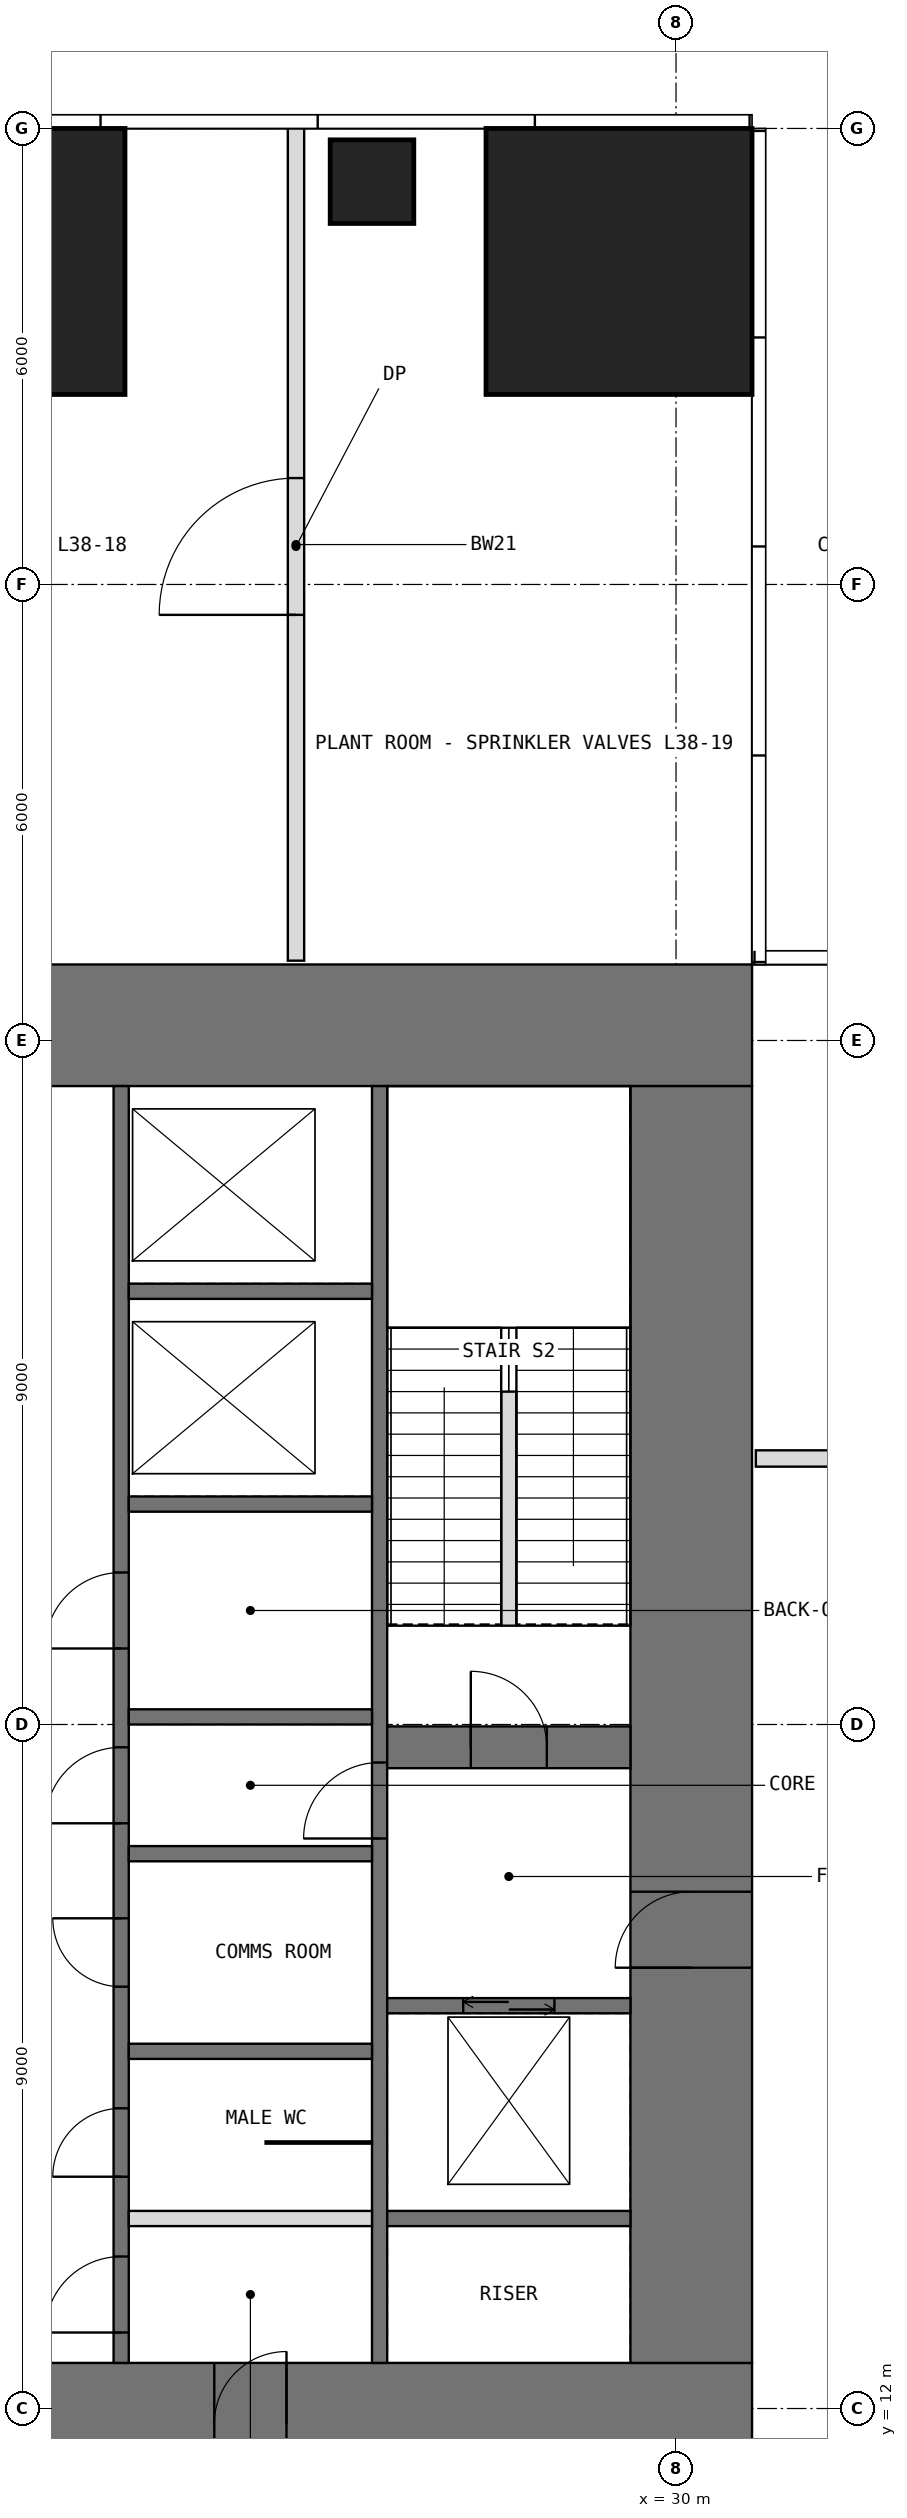
"""IFC4 building model, lengths in metres.
Left out: names, types, materials, properties, quantities, classifications, styles, units other than length and angle.
Written with IfcOpenShell. Run it as: python <this file> out.ifc"""

import sys

from ifc_helpers import new_model, si_unit, direction, frame, frame_2d, origin, origin_2d, place, context, subcontext, project, spatial, rectangle, extrude, element, fill, save


model = new_model("IFC4")
c1 = context("Model", 3, precision=1e-05, world=origin(), true_north=direction((0.0, 1.0)))
c2 = subcontext(c1, "Body", "Model", "MODEL_VIEW")
j1 = project(units=[si_unit("LENGTHUNIT", "METRE"), si_unit("PLANEANGLEUNIT", "RADIAN")], contexts=[c1])
p1 = place(None, origin())
s1 = spatial("IfcSite", under=j1, at=p1, CompositionType="ELEMENT")
p2 = place(p1, origin())
s2 = spatial("IfcBuilding", under=s1, at=p2, CompositionType="ELEMENT")
p3 = place(p2, frame((0.0, 0.0, 160.5)))
s3 = spatial("IfcBuildingStorey", under=s2, at=p3, CompositionType="ELEMENT", Elevation=160.5)
p4 = place(p3, frame((21.0, 40.25, 0.0), z_axis=(0.0, 0.0, 1.0), x_axis=(1.0, 0.0, 0.0)))
e1 = element("IfcColumn", 1, at=p4, inside=s3, PredefinedType="COLUMN", context=c2, shape_type="SweptSolid", body=[
    extrude(rectangle(XDim=3.5, YDim=3.5, at=origin_2d()), origin(), (0.0, 0.0, 1.0), 5.0),
])
p5 = place(p3, frame((26.0, 41.3, 0.0), z_axis=(0.0, 0.0, 1.0), x_axis=(1.0, 0.0, 0.0)))
e2 = element("IfcColumn", 2, at=p5, inside=s3, PredefinedType="COLUMN", context=c2, shape_type="SweptSolid", body=[
    extrude(rectangle(XDim=1.1, YDim=1.1, at=origin_2d()), origin(), (0.0, 0.0, 1.0), 5.0),
])
p6 = place(p3, frame((29.25, 40.25, 0.0), z_axis=(0.0, 0.0, 1.0), x_axis=(1.0, 0.0, 0.0)))
e3 = element("IfcColumn", 3, at=p6, inside=s3, PredefinedType="COLUMN", context=c2, shape_type="SweptSolid", body=[
    extrude(rectangle(XDim=3.5, YDim=3.5, at=origin_2d()), origin(), (0.0, 0.0, 1.0), 5.0),
])
p7 = place(p3, frame((11.0, 11.8, -0.25), z_axis=(0.0, 0.0, 1.0), x_axis=(1.0, 0.0, 0.0)))
e4 = element("IfcWall", 4, at=p7, inside=s3, PredefinedType="SHEAR", context=c2, shape_type="SweptSolid", body=[
    extrude(rectangle(XDim=20.0, YDim=1.6, at=frame_2d((10.0, 0.0))), origin(), (0.0, 0.0, 1.0), 5.2),
])
p8 = place(p7, frame((12.925, 0.0, 0.25)))
e5 = element("IfcOpeningElement", 5, at=p8, cuts=e4, PredefinedType="OPENING", context=c2, shape_type="SweptSolid", body=[
    extrude(rectangle(XDim=0.95, YDim=2.4, at=frame_2d((0.475, 1.2))), frame((0.0, 0.81, 0.0), z_axis=(0.0, -1.0, 0.0), x_axis=(1.0, 0.0, 0.0)), (0.0, 0.0, 1.0), 1.62),
])
p9 = place(p3, frame((11.0, 30.2, -0.25), z_axis=(0.0, 0.0, 1.0), x_axis=(1.0, 0.0, 0.0)))
e6 = element("IfcWall", 6, at=p9, inside=s3, PredefinedType="SHEAR", context=c2, shape_type="SweptSolid", body=[
    extrude(rectangle(XDim=20.0, YDim=1.6, at=frame_2d((10.0, 0.0))), origin(), (0.0, 0.0, 1.0), 5.2),
])
p10 = place(p9, frame((6.125, 0.0, 0.25)))
e7 = element("IfcOpeningElement", 7, at=p10, cuts=e6, PredefinedType="OPENING", context=c2, shape_type="SweptSolid", body=[
    extrude(rectangle(XDim=0.95, YDim=2.4, at=frame_2d((0.475, 1.2))), frame((0.0, 0.81, 0.0), z_axis=(0.0, -1.0, 0.0), x_axis=(1.0, 0.0, 0.0)), (0.0, 0.0, 1.0), 1.62),
])
p11 = place(p3, frame((30.2, 12.6, -0.25), z_axis=(0.0, 0.0, 1.0), x_axis=(0.0, 1.0, 0.0)))
e8 = element("IfcWall", 8, at=p11, inside=s3, PredefinedType="SHEAR", context=c2, shape_type="SweptSolid", body=[
    extrude(rectangle(XDim=16.8, YDim=1.6, at=frame_2d((8.4, 0.0))), origin(), (0.0, 0.0, 1.0), 5.2),
])
p12 = place(p11, frame((5.2, 0.0, 0.25)))
e9 = element("IfcOpeningElement", 9, at=p12, cuts=e8, PredefinedType="OPENING", context=c2, shape_type="SweptSolid", body=[
    extrude(rectangle(XDim=1.0, YDim=2.2, at=frame_2d((0.5, 1.1))), frame((0.0, 0.81, 0.0), z_axis=(0.0, -1.0, 0.0), x_axis=(1.0, 0.0, 0.0)), (0.0, 0.0, 1.0), 1.62),
])
p13 = place(p3, frame((22.7, 12.6, -0.25), z_axis=(0.0, 0.0, 1.0), x_axis=(0.0, 1.0, 0.0)))
e10 = element("IfcWall", 10, at=p13, inside=s3, PredefinedType="SHEAR", context=c2, shape_type="SweptSolid", body=[
    extrude(rectangle(XDim=16.8, YDim=0.2, at=frame_2d((8.4, 0.0))), origin(), (0.0, 0.0, 1.0), 5.2),
])
p14 = place(p13, frame((0.4, 0.0, 0.25)))
e11 = element("IfcOpeningElement", 11, at=p14, cuts=e10, PredefinedType="OPENING", context=c2, shape_type="SweptSolid", body=[
    extrude(rectangle(XDim=1.0, YDim=2.2, at=frame_2d((0.5, 1.1))), frame((0.0, 0.11, 0.0), z_axis=(0.0, -1.0, 0.0), x_axis=(1.0, 0.0, 0.0)), (0.0, 0.0, 1.0), 0.22),
])
p15 = place(p13, frame((7.1, 0.0, 0.25)))
e12 = element("IfcOpeningElement", 12, at=p15, cuts=e10, PredefinedType="OPENING", context=c2, shape_type="SweptSolid", body=[
    extrude(rectangle(XDim=1.0, YDim=2.2, at=frame_2d((0.5, 1.1))), frame((0.0, 0.11, 0.0), z_axis=(0.0, -1.0, 0.0), x_axis=(1.0, 0.0, 0.0)), (0.0, 0.0, 1.0), 0.22),
])
p16 = place(p13, frame((2.45, 0.0, 0.25)))
e13 = element("IfcOpeningElement", 13, at=p16, cuts=e10, PredefinedType="OPENING", context=c2, shape_type="SweptSolid", body=[
    extrude(rectangle(XDim=0.9, YDim=2.2, at=frame_2d((0.45, 1.1))), frame((0.0, 0.11, 0.0), z_axis=(0.0, -1.0, 0.0), x_axis=(1.0, 0.0, 0.0)), (0.0, 0.0, 1.0), 0.22),
])
p17 = place(p13, frame((4.95, 0.0, 0.25)))
e14 = element("IfcOpeningElement", 14, at=p17, cuts=e10, PredefinedType="OPENING", context=c2, shape_type="SweptSolid", body=[
    extrude(rectangle(XDim=0.9, YDim=2.2, at=frame_2d((0.45, 1.1))), frame((0.0, 0.11, 0.0), z_axis=(0.0, -1.0, 0.0), x_axis=(1.0, 0.0, 0.0)), (0.0, 0.0, 1.0), 0.22),
])
p18 = place(p13, frame((9.4, 0.0, 0.25)))
e15 = element("IfcOpeningElement", 15, at=p18, cuts=e10, PredefinedType="OPENING", context=c2, shape_type="SweptSolid", body=[
    extrude(rectangle(XDim=1.0, YDim=2.2, at=frame_2d((0.5, 1.1))), frame((0.0, 0.11, 0.0), z_axis=(0.0, -1.0, 0.0), x_axis=(1.0, 0.0, 0.0)), (0.0, 0.0, 1.0), 0.22),
])
p19 = place(p3, frame((26.1, 12.6, -0.25), z_axis=(0.0, 0.0, 1.0), x_axis=(0.0, 1.0, 0.0)))
e16 = element("IfcWall", 16, at=p19, inside=s3, PredefinedType="SHEAR", context=c2, shape_type="SweptSolid", body=[
    extrude(rectangle(XDim=16.8, YDim=0.2, at=frame_2d((8.4, 0.0))), origin(), (0.0, 0.0, 1.0), 5.2),
])
p20 = place(p19, frame((6.9, 0.0, 0.25)))
e17 = element("IfcOpeningElement", 17, at=p20, cuts=e16, PredefinedType="OPENING", context=c2, shape_type="SweptSolid", body=[
    extrude(rectangle(XDim=1.0, YDim=2.2, at=frame_2d((0.5, 1.1))), frame((0.0, 0.11, 0.0), z_axis=(0.0, -1.0, 0.0), x_axis=(1.0, 0.0, 0.0)), (0.0, 0.0, 1.0), 0.22),
])
for number, where, z_axis, x_axis in (
    (18, (22.8, 16.7, -0.25), (0.0, 0.0, 1.0), (1.0, 0.0, 0.0)),
    (19, (22.8, 19.3, -0.25), (0.0, 0.0, 1.0), (1.0, 0.0, 0.0)),
    (20, (22.8, 21.1, -0.25), (0.0, 0.0, 1.0), (1.0, 0.0, 0.0)),
    (21, (22.8, 23.9, -0.25), (0.0, 0.0, 1.0), (1.0, 0.0, 0.0)),
    (22, (22.8, 26.7, -0.25), (0.0, 0.0, 1.0), (1.0, 0.0, 0.0)),
    (23, (26.2, 14.5, -0.25), (0.0, 0.0, 1.0), (1.0, 0.0, 0.0)),
):
    element("IfcWall", number, at=place(p3, frame(where, z_axis=z_axis, x_axis=x_axis)), inside=s3, PredefinedType="SHEAR", context=c2, shape_type="SweptSolid", body=[
        extrude(rectangle(XDim=3.2, YDim=0.2, at=frame_2d((1.6, 0.0))), origin(), (0.0, 0.0, 1.0), 5.2),
    ])
p21 = place(p3, frame((26.2, 17.3, -0.25), z_axis=(0.0, 0.0, 1.0), x_axis=(1.0, 0.0, 0.0)))
e24 = element("IfcWall", 24, at=p21, inside=s3, PredefinedType="SHEAR", context=c2, shape_type="SweptSolid", body=[
    extrude(rectangle(XDim=3.2, YDim=0.2, at=frame_2d((1.6, 0.0))), origin(), (0.0, 0.0, 1.0), 5.2),
])
p22 = place(p21, frame((1.0, 0.0, 0.25)))
e25 = element("IfcOpeningElement", 25, at=p22, cuts=e24, PredefinedType="OPENING", context=c2, shape_type="SweptSolid", body=[
    extrude(rectangle(XDim=1.2, YDim=2.2, at=frame_2d((0.6, 1.1))), frame((0.0, 0.11, 0.0), z_axis=(0.0, -1.0, 0.0), x_axis=(1.0, 0.0, 0.0)), (0.0, 0.0, 1.0), 0.22),
])
p23 = place(p3, frame((26.2, 20.7, -0.25), z_axis=(0.0, 0.0, 1.0), x_axis=(1.0, 0.0, 0.0)))
e26 = element("IfcWall", 26, at=p23, inside=s3, PredefinedType="SHEAR", context=c2, shape_type="SweptSolid", body=[
    extrude(rectangle(XDim=3.2, YDim=0.55, at=frame_2d((1.6, 0.0))), origin(), (0.0, 0.0, 1.0), 5.2),
])
p24 = place(p23, frame((1.1, 0.0, 0.25)))
e27 = element("IfcOpeningElement", 27, at=p24, cuts=e26, PredefinedType="OPENING", context=c2, shape_type="SweptSolid", body=[
    extrude(rectangle(XDim=1.0, YDim=2.2, at=frame_2d((0.5, 1.1))), frame((0.0, 0.285, 0.0), z_axis=(0.0, -1.0, 0.0), x_axis=(1.0, 0.0, 0.0)), (0.0, 0.0, 1.0), 0.57),
])
p25 = place(p3, frame((22.8, 14.5, 0.0), z_axis=(0.0, 0.0, 1.0), x_axis=(1.0, 0.0, 0.0)))
e28 = element("IfcWall", 28, at=p25, inside=s3, PredefinedType="PARTITIONING", context=c2, shape_type="SweptSolid", body=[
    extrude(rectangle(XDim=3.2, YDim=0.2, at=frame_2d((1.6, 0.0))), origin(), (0.0, 0.0, 1.0), 4.75),
])
p26 = place(p3, frame((24.6, 15.5, 0.0), z_axis=(0.0, 0.0, 1.0), x_axis=(1.0, 0.0, 0.0)))
e29 = element("IfcWall", 29, at=p26, inside=s3, PredefinedType="PARTITIONING", context=c2, shape_type="SweptSolid", body=[
    extrude(rectangle(XDim=1.4, YDim=0.03, at=frame_2d((0.7, 0.0))), origin(), (0.0, 0.0, 1.0), 4.75),
])
p27 = place(p3, frame((25.0, 31.05, 0.0), z_axis=(0.0, 0.0, 1.0), x_axis=(0.0, 1.0, 0.0)))
e30 = element("IfcWall", 30, at=p27, inside=s3, PredefinedType="PARTITIONING", context=c2, shape_type="SweptSolid", body=[
    extrude(rectangle(XDim=10.95, YDim=0.215, at=frame_2d((5.475, 0.0))), origin(), (0.0, 0.0, 1.0), 4.75),
])
p28 = place(p27, frame((4.55, 0.0, 0.0)))
e31 = element("IfcOpeningElement", 31, at=p28, cuts=e30, PredefinedType="OPENING", context=c2, shape_type="SweptSolid", body=[
    extrude(rectangle(XDim=1.8, YDim=2.4, at=frame_2d((0.9, 1.2))), frame((0.0, 0.118, 0.0), z_axis=(0.0, -1.0, 0.0), x_axis=(1.0, 0.0, 0.0)), (0.0, 0.0, 1.0), 0.235),
])
p29 = place(p3, frame((31.05, 24.5, 0.0), z_axis=(0.0, 0.0, 1.0), x_axis=(1.0, 0.0, 0.0)))
e32 = element("IfcWall", 32, at=p29, inside=s3, PredefinedType="PARTITIONING", context=c2, shape_type="SweptSolid", body=[
    extrude(rectangle(XDim=10.95, YDim=0.215, at=frame_2d((5.475, 0.0))), origin(), (0.0, 0.0, 1.0), 4.75),
])
p30 = place(p29, frame((4.55, 0.0, 0.0)))
e33 = element("IfcOpeningElement", 33, at=p30, cuts=e32, PredefinedType="OPENING", context=c2, shape_type="SweptSolid", body=[
    extrude(rectangle(XDim=1.8, YDim=2.4, at=frame_2d((0.9, 1.2))), frame((0.0, 0.118, 0.0), z_axis=(0.0, -1.0, 0.0), x_axis=(1.0, 0.0, 0.0)), (0.0, 0.0, 1.0), 0.235),
])
p31 = place(p3, frame((27.8, 22.3, 0.0), z_axis=(0.0, 0.0, 1.0), x_axis=(0.0, 1.0, 0.0)))
e34 = element("IfcWall", 34, at=p31, inside=s3, PredefinedType="PARTITIONING", context=c2, shape_type="SweptSolid", body=[
    extrude(rectangle(XDim=3.08, YDim=0.2, at=frame_2d((1.54, 0.0))), origin(), (0.0, 0.0, 1.0), 5.0),
])
p32 = place(p14, origin())
e35 = element("IfcDoor", 35, at=p32, inside=s3, OperationType="SINGLE_SWING_LEFT", PredefinedType="DOOR", context=c2, shape_type="SweptSolid", body=[
    extrude(rectangle(XDim=1.0, YDim=2.2, at=frame_2d((0.5, 1.1))), frame((0.0, 0.025, 0.0), z_axis=(0.0, -1.0, 0.0), x_axis=(1.0, 0.0, 0.0)), (0.0, 0.0, 1.0), 0.05),
])
fill(e11, e35)
p33 = place(p8, origin())
e36 = element("IfcDoor", 36, at=p33, inside=s3, OperationType="SINGLE_SWING_RIGHT", PredefinedType="DOOR", context=c2, shape_type="SweptSolid", body=[
    extrude(rectangle(XDim=0.95, YDim=2.4, at=frame_2d((0.475, 1.2))), frame((0.0, -0.075, 0.0), z_axis=(0.0, -1.0, 0.0), x_axis=(1.0, 0.0, 0.0)), (0.0, 0.0, 1.0), 0.05),
])
fill(e5, e36)
p34 = place(p12, origin())
e37 = element("IfcDoor", 37, at=p34, inside=s3, OperationType="SINGLE_SWING_LEFT", PredefinedType="DOOR", context=c2, shape_type="SweptSolid", body=[
    extrude(rectangle(XDim=1.0, YDim=2.2, at=frame_2d((0.5, 1.1))), frame((0.0, -0.075, 0.0), z_axis=(0.0, -1.0, 0.0), x_axis=(1.0, 0.0, 0.0)), (0.0, 0.0, 1.0), 0.05),
])
fill(e9, e37)
p35 = place(p24, origin())
e38 = element("IfcDoor", 38, at=p35, inside=s3, OperationType="SINGLE_SWING_LEFT", PredefinedType="DOOR", context=c2, shape_type="SweptSolid", body=[
    extrude(rectangle(XDim=1.0, YDim=2.2, at=frame_2d((0.5, 1.1))), frame((0.0, 0.025, 0.0), z_axis=(0.0, -1.0, 0.0), x_axis=(1.0, 0.0, 0.0)), (0.0, 0.0, 1.0), 0.05),
])
fill(e27, e38)
p36 = place(p20, origin())
e39 = element("IfcDoor", 39, at=p36, inside=s3, OperationType="SINGLE_SWING_LEFT", PredefinedType="DOOR", context=c2, shape_type="SweptSolid", body=[
    extrude(rectangle(XDim=1.0, YDim=2.2, at=frame_2d((0.5, 1.1))), frame((0.0, 0.025, 0.0), z_axis=(0.0, -1.0, 0.0), x_axis=(1.0, 0.0, 0.0)), (0.0, 0.0, 1.0), 0.05),
])
fill(e17, e39)
p37 = place(p15, origin())
e40 = element("IfcDoor", 40, at=p37, inside=s3, OperationType="SINGLE_SWING_LEFT", PredefinedType="DOOR", context=c2, shape_type="SweptSolid", body=[
    extrude(rectangle(XDim=1.0, YDim=2.2, at=frame_2d((0.5, 1.1))), frame((0.0, 0.025, 0.0), z_axis=(0.0, -1.0, 0.0), x_axis=(1.0, 0.0, 0.0)), (0.0, 0.0, 1.0), 0.05),
])
fill(e12, e40)
p38 = place(p16, origin())
e41 = element("IfcDoor", 41, at=p38, inside=s3, OperationType="SINGLE_SWING_LEFT", PredefinedType="DOOR", context=c2, shape_type="SweptSolid", body=[
    extrude(rectangle(XDim=0.9, YDim=2.2, at=frame_2d((0.45, 1.1))), frame((0.0, 0.025, 0.0), z_axis=(0.0, -1.0, 0.0), x_axis=(1.0, 0.0, 0.0)), (0.0, 0.0, 1.0), 0.05),
])
fill(e13, e41)
p39 = place(p17, origin())
e42 = element("IfcDoor", 42, at=p39, inside=s3, OperationType="SINGLE_SWING_RIGHT", PredefinedType="DOOR", context=c2, shape_type="SweptSolid", body=[
    extrude(rectangle(XDim=0.9, YDim=2.2, at=frame_2d((0.45, 1.1))), frame((0.0, 0.025, 0.0), z_axis=(0.0, -1.0, 0.0), x_axis=(1.0, 0.0, 0.0)), (0.0, 0.0, 1.0), 0.05),
])
fill(e14, e42)
p40 = place(p18, origin())
e43 = element("IfcDoor", 43, at=p40, inside=s3, OperationType="SINGLE_SWING_LEFT", PredefinedType="DOOR", context=c2, shape_type="SweptSolid", body=[
    extrude(rectangle(XDim=1.0, YDim=2.2, at=frame_2d((0.5, 1.1))), frame((0.0, 0.025, 0.0), z_axis=(0.0, -1.0, 0.0), x_axis=(1.0, 0.0, 0.0)), (0.0, 0.0, 1.0), 0.05),
])
fill(e15, e43)
p41 = place(p28, origin())
e44 = element("IfcDoor", 44, at=p41, inside=s3, OperationType="DOUBLE_DOOR_SINGLE_SWING", PredefinedType="DOOR", context=c2, shape_type="SweptSolid", body=[
    extrude(rectangle(XDim=1.8, YDim=2.4, at=frame_2d((0.9, 1.2))), frame((0.0, 0.025, 0.0), z_axis=(0.0, -1.0, 0.0), x_axis=(1.0, 0.0, 0.0)), (0.0, 0.0, 1.0), 0.05),
])
fill(e31, e44)
p42 = place(p22, origin())
e45 = element("IfcDoor", 45, at=p42, inside=s3, OperationType="DOUBLE_DOOR_SLIDING", PredefinedType="DOOR", context=c2, shape_type="SweptSolid", body=[
    extrude(rectangle(XDim=1.2, YDim=2.2, at=frame_2d((0.6, 1.1))), frame((0.0, 0.025, 0.0), z_axis=(0.0, -1.0, 0.0), x_axis=(1.0, 0.0, 0.0)), (0.0, 0.0, 1.0), 0.05),
])
fill(e25, e45)
save(model, sys.argv[1])
